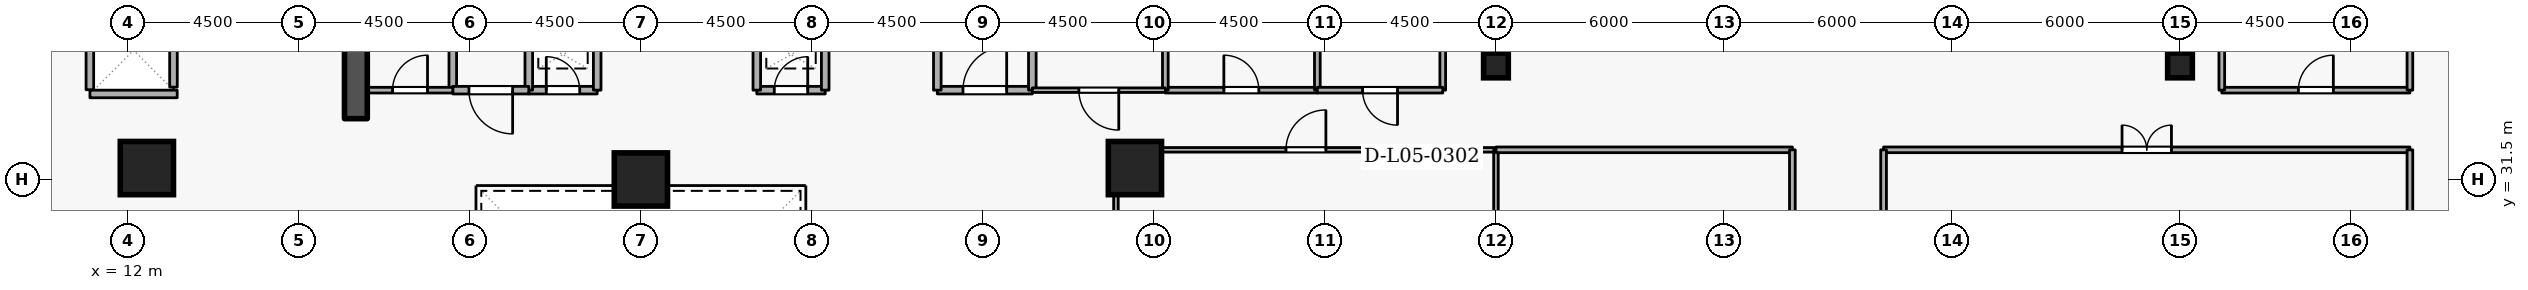
"""IFC4 building model, lengths in metres.
Left out: names, types, materials, properties, quantities, classifications, styles, units other than length and angle.
Written with IfcOpenShell. Run it as: python <this file> out.ifc"""

import sys

from ifc_helpers import new_model, si_unit, direction, frame, frame_2d, origin, origin_2d, place, context, subcontext, project, spatial, rectangle, extrude, element, fill, save


model = new_model("IFC4")
c1 = context("Model", 3, precision=1e-05, world=origin(), true_north=direction((0.0, 1.0)))
c2 = subcontext(c1, "Body", "Model", "MODEL_VIEW")
j1 = project(units=[si_unit("LENGTHUNIT", "METRE"), si_unit("PLANEANGLEUNIT", "RADIAN")], contexts=[c1])
p1 = place(None, origin())
s1 = spatial("IfcSite", under=j1, at=p1, CompositionType="ELEMENT")
p2 = place(p1, origin())
s2 = spatial("IfcBuilding", under=s1, at=p2, CompositionType="ELEMENT")
p3 = place(p2, frame((0.0, 0.0, 23.1)))
s3 = spatial("IfcBuildingStorey", under=s2, at=p3, CompositionType="ELEMENT", Elevation=23.1)
p4 = place(p3, frame((18.0, 33.1, 0.0), z_axis=(0.0, 0.0, 1.0), x_axis=(0.0, 1.0, 0.0)))
e1 = element("IfcWall", 1, at=p4, inside=s3, PredefinedType="SHEAR", context=c2, shape_type="SweptSolid", body=[
    extrude(rectangle(XDim=5.7, YDim=0.6, at=frame_2d((2.85, 0.0))), origin(), (0.0, 0.0, 1.0), 4.8),
])
for number, where, z_axis, x_axis in (
    (2, (12.5, 31.8, 0.0), (0.0, 0.0, 1.0), (1.0, 0.0, 0.0)),
    (3, (38.5, 31.8, 0.0), (0.0, 0.0, 1.0), (1.0, 0.0, 0.0)),
    (4, (25.5, 31.5, 0.0), (0.0, 0.0, 1.0), (1.0, 0.0, 0.0)),
):
    element("IfcColumn", number, at=place(p3, frame(where, z_axis=z_axis, x_axis=x_axis)), inside=s3, PredefinedType="COLUMN", context=c2, shape_type="SweptSolid", body=[
        extrude(rectangle(XDim=1.4, YDim=1.4, at=origin_2d()), origin(), (0.0, 0.0, 1.0), 4.8),
    ])
for number, where, z_axis, x_axis in (
    (5, (48.0, 34.5, 0.0), (0.0, 0.0, 1.0), (1.0, 0.0, 0.0)),
    (6, (66.0, 34.5, 0.0), (0.0, 0.0, 1.0), (1.0, 0.0, 0.0)),
):
    element("IfcColumn", number, at=place(p3, frame(where, z_axis=z_axis, x_axis=x_axis)), inside=s3, PredefinedType="COLUMN", context=c2, shape_type="SweptSolid", body=[
        extrude(rectangle(XDim=0.65, YDim=0.65, at=origin_2d()), origin(), (0.0, 0.0, 1.0), 4.8),
    ])
p5 = place(p3, frame((13.2, 33.93, 0.0), z_axis=(0.0, 0.0, 1.0), x_axis=(0.0, 1.0, 0.0)))
e7 = element("IfcWall", 7, at=p5, inside=s3, PredefinedType="STANDARD", context=c2, shape_type="SweptSolid", body=[
    extrude(rectangle(XDim=1.94, YDim=0.2, at=frame_2d((0.97, 0.0))), origin(), (0.0, 0.0, 1.0), 4.54),
])
p6 = place(p3, frame((11.002, 33.75, 0.0), z_axis=(0.0, 0.0, 1.0), x_axis=(1.0, 0.0, 0.0)))
e8 = element("IfcWall", 8, at=p6, inside=s3, PredefinedType="STANDARD", context=c2, shape_type="SweptSolid", body=[
    extrude(rectangle(XDim=2.296, YDim=0.2, at=frame_2d((1.148, 0.0))), origin(), (0.0, 0.0, 1.0), 4.54),
])
p7 = place(p3, frame((11.0, 33.862, 0.0), z_axis=(0.0, 0.0, 1.0), x_axis=(0.0, 1.0, 0.0)))
e9 = element("IfcWall", 9, at=p7, inside=s3, PredefinedType="STANDARD", context=c2, shape_type="SweptSolid", body=[
    extrude(rectangle(XDim=2.076, YDim=0.2, at=frame_2d((1.038, 0.0))), origin(), (0.0, 0.0, 1.0), 4.54),
])
p8 = place(p3, frame((33.3, 33.85, 0.0), z_axis=(0.0, 0.0, 1.0), x_axis=(1.0, 0.0, 0.0)))
e10 = element("IfcWall", 10, at=p8, inside=s3, PredefinedType="STANDARD", context=c2, shape_type="SweptSolid", body=[
    extrude(rectangle(XDim=2.5, YDim=0.2, at=frame_2d((1.25, 0.0))), origin(), (0.0, 0.0, 1.0), 4.54),
])
p9 = place(p8, frame((0.675, 0.0, 0.0)))
e11 = element("IfcOpeningElement", 11, at=p9, cuts=e10, PredefinedType="OPENING", context=c2, shape_type="SweptSolid", body=[
    extrude(rectangle(XDim=1.15, YDim=2.1, at=frame_2d((0.575, 1.05))), frame((0.0, 0.11, 0.0), z_axis=(0.0, -1.0, 0.0), x_axis=(1.0, 0.0, 0.0)), (0.0, 0.0, 1.0), 0.22),
])
p10 = place(p3, frame((35.8, 33.85, 0.0), z_axis=(0.0, 0.0, 1.0), x_axis=(0.0, 1.0, 0.0)))
e12 = element("IfcWall", 12, at=p10, inside=s3, PredefinedType="STANDARD", context=c2, shape_type="SweptSolid", body=[
    extrude(rectangle(XDim=5.15, YDim=0.2, at=frame_2d((2.575, 0.0))), origin(), (0.0, 0.0, 1.0), 4.54),
])
p11 = place(p3, frame((33.3, 35.6, 0.0), z_axis=(0.0, 0.0, 1.0), x_axis=(0.0, -1.0, 0.0)))
e13 = element("IfcWall", 13, at=p11, inside=s3, PredefinedType="STANDARD", context=c2, shape_type="SweptSolid", body=[
    extrude(rectangle(XDim=1.75, YDim=0.2, at=frame_2d((0.875, 0.0))), origin(), (0.0, 0.0, 1.0), 3.745),
])
p12 = place(p3, frame((22.55, 33.85, 0.0), z_axis=(0.0, 0.0, 1.0), x_axis=(1.0, 0.0, 0.0)))
e14 = element("IfcWall", 14, at=p12, inside=s3, PredefinedType="STANDARD", context=c2, shape_type="SweptSolid", body=[
    extrude(rectangle(XDim=1.8, YDim=0.2, at=frame_2d((0.9, 0.0))), origin(), (0.0, 0.0, 1.0), 4.54),
])
p13 = place(p12, frame((0.46, 0.0, 0.0)))
e15 = element("IfcOpeningElement", 15, at=p13, cuts=e14, PredefinedType="OPENING", context=c2, shape_type="SweptSolid", body=[
    extrude(rectangle(XDim=0.88, YDim=2.04, at=frame_2d((0.44, 1.02))), frame((0.0, 0.11, 0.0), z_axis=(0.0, -1.0, 0.0), x_axis=(1.0, 0.0, 0.0)), (0.0, 0.0, 1.0), 0.22),
])
for number, where, z_axis, x_axis in (
    (16, (24.35, 33.85, 0.0), (0.0, 0.0, 1.0), (0.0, 1.0, 0.0)),
    (17, (22.55, 35.35, 0.0), (0.0, 0.0, 1.0), (0.0, -1.0, 0.0)),
):
    element("IfcWall", number, at=place(p3, frame(where, z_axis=z_axis, x_axis=x_axis)), inside=s3, PredefinedType="STANDARD", context=c2, shape_type="SweptSolid", body=[
        extrude(rectangle(XDim=1.5, YDim=0.2, at=frame_2d((0.75, 0.0))), origin(), (0.0, 0.0, 1.0), 4.54),
    ])
p14 = place(p3, frame((28.55, 33.85, 0.0), z_axis=(0.0, 0.0, 1.0), x_axis=(1.0, 0.0, 0.0)))
e18 = element("IfcWall", 18, at=p14, inside=s3, PredefinedType="STANDARD", context=c2, shape_type="SweptSolid", body=[
    extrude(rectangle(XDim=1.8, YDim=0.2, at=frame_2d((0.9, 0.0))), origin(), (0.0, 0.0, 1.0), 4.54),
])
p15 = place(p14, frame((0.46, 0.0, 0.0)))
e19 = element("IfcOpeningElement", 19, at=p15, cuts=e18, PredefinedType="OPENING", context=c2, shape_type="SweptSolid", body=[
    extrude(rectangle(XDim=0.88, YDim=2.04, at=frame_2d((0.44, 1.02))), frame((0.0, 0.11, 0.0), z_axis=(0.0, -1.0, 0.0), x_axis=(1.0, 0.0, 0.0)), (0.0, 0.0, 1.0), 0.22),
])
for number, where, z_axis, x_axis in (
    (20, (30.35, 33.85, 0.0), (0.0, 0.0, 1.0), (0.0, 1.0, 0.0)),
    (21, (28.55, 35.35, 0.0), (0.0, 0.0, 1.0), (0.0, -1.0, 0.0)),
    (22, (20.55, 33.85, 0.0), (0.0, 0.0, 1.0), (0.0, 1.0, 0.0)),
):
    element("IfcWall", number, at=place(p3, frame(where, z_axis=z_axis, x_axis=x_axis)), inside=s3, PredefinedType="STANDARD", context=c2, shape_type="SweptSolid", body=[
        extrude(rectangle(XDim=1.5, YDim=0.2, at=frame_2d((0.75, 0.0))), origin(), (0.0, 0.0, 1.0), 4.54),
    ])
p16 = place(p3, frame((22.55, 33.85, 0.0), z_axis=(0.0, 0.0, 1.0), x_axis=(-1.0, 0.0, 0.0)))
e23 = element("IfcWall", 23, at=p16, inside=s3, PredefinedType="STANDARD", context=c2, shape_type="SweptSolid", body=[
    extrude(rectangle(XDim=2.0, YDim=0.2, at=frame_2d((1.0, 0.0))), origin(), (0.0, 0.0, 1.0), 4.54),
])
p17 = place(p16, frame((0.425, 0.0, 0.0)))
e24 = element("IfcOpeningElement", 24, at=p17, cuts=e23, PredefinedType="OPENING", context=c2, shape_type="SweptSolid", body=[
    extrude(rectangle(XDim=1.15, YDim=2.1, at=frame_2d((0.575, 1.05))), frame((0.0, 0.11, 0.0), z_axis=(0.0, -1.0, 0.0), x_axis=(1.0, 0.0, 0.0)), (0.0, 0.0, 1.0), 0.22),
])
p18 = place(p3, frame((18.3, 33.85, 0.0), z_axis=(0.0, 0.0, 1.0), x_axis=(1.0, 0.0, 0.0)))
e25 = element("IfcWall", 25, at=p18, inside=s3, PredefinedType="PARTITIONING", context=c2, shape_type="SweptSolid", body=[
    extrude(rectangle(XDim=2.25, YDim=0.15, at=frame_2d((1.125, 0.0))), origin(), (0.0, 0.0, 1.0), 4.54),
])
p19 = place(p18, frame((0.665, 0.0, 0.0)))
e26 = element("IfcOpeningElement", 26, at=p19, cuts=e25, PredefinedType="OPENING", context=c2, shape_type="SweptSolid", body=[
    extrude(rectangle(XDim=0.92, YDim=2.08, at=frame_2d((0.46, 1.04))), frame((0.0, 0.085, 0.0), z_axis=(0.0, -1.0, 0.0), x_axis=(1.0, 0.0, 0.0)), (0.0, 0.0, 1.0), 0.17),
])
p20 = place(p3, frame((39.3, 33.85, 0.0), z_axis=(0.0, 0.0, 1.0), x_axis=(1.0, 0.0, 0.0)))
e27 = element("IfcWall", 27, at=p20, inside=s3, PredefinedType="PARTITIONING", context=c2, shape_type="SweptSolid", body=[
    extrude(rectangle(XDim=4.0, YDim=0.15, at=frame_2d((2.0, 0.0))), origin(), (0.0, 0.0, 1.0), 4.54),
])
p21 = place(p20, frame((1.54, 0.0, 0.0)))
e28 = element("IfcOpeningElement", 28, at=p21, cuts=e27, PredefinedType="OPENING", context=c2, shape_type="SweptSolid", body=[
    extrude(rectangle(XDim=0.92, YDim=2.08, at=frame_2d((0.46, 1.04))), frame((0.0, 0.085, 0.0), z_axis=(0.0, -1.0, 0.0), x_axis=(1.0, 0.0, 0.0)), (0.0, 0.0, 1.0), 0.17),
])
for number, where, z_axis, x_axis in (
    (29, (43.3, 33.85, 0.0), (0.0, 0.0, 1.0), (0.0, 1.0, 0.0)),
    (30, (39.3, 37.8, 0.0), (0.0, 0.0, 1.0), (0.0, -1.0, 0.0)),
):
    element("IfcWall", number, at=place(p3, frame(where, z_axis=z_axis, x_axis=x_axis)), inside=s3, PredefinedType="PARTITIONING", context=c2, shape_type="SweptSolid", body=[
        extrude(rectangle(XDim=3.95, YDim=0.15, at=frame_2d((1.975, 0.0))), origin(), (0.0, 0.0, 1.0), 4.54),
    ])
p22 = place(p3, frame((67.1, 33.85, 0.0), z_axis=(0.0, 0.0, 1.0), x_axis=(1.0, 0.0, 0.0)))
e31 = element("IfcWall", 31, at=p22, inside=s3, PredefinedType="PARTITIONING", context=c2, shape_type="SweptSolid", body=[
    extrude(rectangle(XDim=4.95, YDim=0.15, at=frame_2d((2.475, 0.0))), origin(), (0.0, 0.0, 1.0), 4.54),
])
p23 = place(p22, frame((2.015, 0.0, 0.0)))
e32 = element("IfcOpeningElement", 32, at=p23, cuts=e31, PredefinedType="OPENING", context=c2, shape_type="SweptSolid", body=[
    extrude(rectangle(XDim=0.92, YDim=2.08, at=frame_2d((0.46, 1.04))), frame((0.0, 0.085, 0.0), z_axis=(0.0, -1.0, 0.0), x_axis=(1.0, 0.0, 0.0)), (0.0, 0.0, 1.0), 0.17),
])
for number, where, z_axis, x_axis in (
    (33, (72.05, 33.85, 0.0), (0.0, 0.0, 1.0), (0.0, 1.0, 0.0)),
    (34, (67.1, 37.8, 0.0), (0.0, 0.0, 1.0), (0.0, -1.0, 0.0)),
    (35, (46.6, 37.8, 0.0), (0.0, 0.0, 1.0), (0.0, -1.0, 0.0)),
):
    element("IfcWall", number, at=place(p3, frame(where, z_axis=z_axis, x_axis=x_axis)), inside=s3, PredefinedType="PARTITIONING", context=c2, shape_type="SweptSolid", body=[
        extrude(rectangle(XDim=3.95, YDim=0.15, at=frame_2d((1.975, 0.0))), origin(), (0.0, 0.0, 1.0), 4.54),
    ])
p24 = place(p3, frame((46.6, 33.85, 0.0), z_axis=(0.0, 0.0, 1.0), x_axis=(-1.0, 0.0, 0.0)))
e36 = element("IfcWall", 36, at=p24, inside=s3, PredefinedType="PARTITIONING", context=c2, shape_type="SweptSolid", body=[
    extrude(rectangle(XDim=3.3, YDim=0.15, at=frame_2d((1.65, 0.0))), origin(), (0.0, 0.0, 1.0), 4.54),
])
p25 = place(p24, frame((1.19, 0.0, 0.0)))
e37 = element("IfcOpeningElement", 37, at=p25, cuts=e36, PredefinedType="OPENING", context=c2, shape_type="SweptSolid", body=[
    extrude(rectangle(XDim=0.92, YDim=2.08, at=frame_2d((0.46, 1.04))), frame((0.0, 0.085, 0.0), z_axis=(0.0, -1.0, 0.0), x_axis=(1.0, 0.0, 0.0)), (0.0, 0.0, 1.0), 0.17),
])
p26 = place(p3, frame((38.0, 32.28, 0.0), z_axis=(0.0, 0.0, 1.0), x_axis=(1.0, 0.0, 0.0)))
e38 = element("IfcWall", 38, at=p26, inside=s3, PredefinedType="PARTITIONING", context=c2, shape_type="SweptSolid", body=[
    extrude(rectangle(XDim=10.0, YDim=0.12, at=frame_2d((5.0, 0.0))), origin(), (0.0, 0.0, 1.0), 4.54),
])
p27 = place(p26, frame((4.475, 0.0, 0.0)))
e39 = element("IfcOpeningElement", 39, at=p27, cuts=e38, PredefinedType="OPENING", context=c2, shape_type="SweptSolid", body=[
    extrude(rectangle(XDim=1.05, YDim=2.1, at=frame_2d((0.525, 1.05))), frame((0.0, 0.07, 0.0), z_axis=(0.0, -1.0, 0.0), x_axis=(1.0, 0.0, 0.0)), (0.0, 0.0, 1.0), 0.14),
])
p28 = place(p3, frame((48.0, 32.28, 0.0), z_axis=(0.0, 0.0, 1.0), x_axis=(0.0, -1.0, 0.0)))
e40 = element("IfcWall", 40, at=p28, inside=s3, PredefinedType="PARTITIONING", context=c2, shape_type="SweptSolid", body=[
    extrude(rectangle(XDim=9.98, YDim=0.12, at=frame_2d((4.99, 0.0))), origin(), (0.0, 0.0, 1.0), 3.694),
])
p29 = place(p3, frame((38.0, 22.3, 0.0), z_axis=(0.0, 0.0, 1.0), x_axis=(0.0, 1.0, 0.0)))
e41 = element("IfcWall", 41, at=p29, inside=s3, PredefinedType="PARTITIONING", context=c2, shape_type="SweptSolid", body=[
    extrude(rectangle(XDim=9.98, YDim=0.12, at=frame_2d((4.99, 0.0))), origin(), (0.0, 0.0, 1.0), 4.54),
])
p30 = place(p3, frame((58.2, 32.28, 0.0), z_axis=(0.0, 0.0, 1.0), x_axis=(1.0, 0.0, 0.0)))
e42 = element("IfcWall", 42, at=p30, inside=s3, PredefinedType="PARTITIONING", context=c2, shape_type="SweptSolid", body=[
    extrude(rectangle(XDim=13.85, YDim=0.15, at=frame_2d((6.925, 0.0))), origin(), (0.0, 0.0, 1.0), 4.54),
])
p31 = place(p30, frame((6.275, 0.0, 0.0)))
e43 = element("IfcOpeningElement", 43, at=p31, cuts=e42, PredefinedType="OPENING", context=c2, shape_type="SweptSolid", body=[
    extrude(rectangle(XDim=1.3, YDim=2.12, at=frame_2d((0.65, 1.06))), frame((0.0, 0.085, 0.0), z_axis=(0.0, -1.0, 0.0), x_axis=(1.0, 0.0, 0.0)), (0.0, 0.0, 1.0), 0.17),
])
for number, where, z_axis, x_axis in (
    (44, (72.05, 32.28, 0.0), (0.0, 0.0, 1.0), (0.0, -1.0, 0.0)),
    (45, (58.2, 22.3, 0.0), (0.0, 0.0, 1.0), (0.0, 1.0, 0.0)),
):
    element("IfcWall", number, at=place(p3, frame(where, z_axis=z_axis, x_axis=x_axis)), inside=s3, PredefinedType="PARTITIONING", context=c2, shape_type="SweptSolid", body=[
        extrude(rectangle(XDim=9.98, YDim=0.15, at=frame_2d((4.99, 0.0))), origin(), (0.0, 0.0, 1.0), 4.54),
    ])
p32 = place(p3, frame((39.3, 33.85, 0.0), z_axis=(0.0, 0.0, 1.0), x_axis=(-1.0, 0.0, 0.0)))
e46 = element("IfcWall", 46, at=p32, inside=s3, PredefinedType="PARTITIONING", context=c2, shape_type="SweptSolid", body=[
    extrude(rectangle(XDim=3.5, YDim=0.12, at=frame_2d((1.75, 0.0))), origin(), (0.0, 0.0, 1.0), 4.54),
])
p33 = place(p32, frame((1.225, 0.0, 0.0)))
e47 = element("IfcOpeningElement", 47, at=p33, cuts=e46, PredefinedType="OPENING", context=c2, shape_type="SweptSolid", body=[
    extrude(rectangle(XDim=1.05, YDim=2.1, at=frame_2d((0.525, 1.05))), frame((0.0, 0.07, 0.0), z_axis=(0.0, -1.0, 0.0), x_axis=(1.0, 0.0, 0.0)), (0.0, 0.0, 1.0), 0.14),
])
p34 = place(p3, frame((48.0, 32.28, 0.0), z_axis=(0.0, 0.0, 1.0), x_axis=(1.0, 0.0, 0.0)))
e48 = element("IfcWall", 48, at=p34, inside=s3, PredefinedType="PARTITIONING", context=c2, shape_type="SweptSolid", body=[
    extrude(rectangle(XDim=7.8, YDim=0.15, at=frame_2d((3.9, 0.0))), origin(), (0.0, 0.0, 1.0), 4.54),
])
p35 = place(p3, frame((55.8, 32.28, 0.0), z_axis=(0.0, 0.0, 1.0), x_axis=(0.0, -1.0, 0.0)))
e49 = element("IfcWall", 49, at=p35, inside=s3, PredefinedType="PARTITIONING", context=c2, shape_type="SweptSolid", body=[
    extrude(rectangle(XDim=9.98, YDim=0.15, at=frame_2d((4.99, 0.0))), origin(), (0.0, 0.0, 1.0), 4.54),
])
p36 = place(p35, frame((4.34, 0.0, 0.0)))
e50 = element("IfcOpeningElement", 50, at=p36, cuts=e49, PredefinedType="OPENING", context=c2, shape_type="SweptSolid", body=[
    extrude(rectangle(XDim=1.3, YDim=2.12, at=frame_2d((0.65, 1.06))), frame((0.0, 0.085, 0.0), z_axis=(0.0, -1.0, 0.0), x_axis=(1.0, 0.0, 0.0)), (0.0, 0.0, 1.0), 0.17),
])
p37 = place(p9, origin())
e51 = element("IfcDoor", 51, at=p37, inside=s3, OperationType="SINGLE_SWING_RIGHT", PredefinedType="DOOR", context=c2, shape_type="SweptSolid", body=[
    extrude(rectangle(XDim=1.15, YDim=2.1, at=frame_2d((0.575, 1.05))), frame((0.0, 0.025, 0.0), z_axis=(0.0, -1.0, 0.0), x_axis=(1.0, 0.0, 0.0)), (0.0, 0.0, 1.0), 0.05),
])
fill(e11, e51)
p38 = place(p13, origin())
e52 = element("IfcDoor", 52, at=p38, inside=s3, OperationType="SINGLE_SWING_LEFT", PredefinedType="DOOR", context=c2, shape_type="SweptSolid", body=[
    extrude(rectangle(XDim=0.88, YDim=2.04, at=frame_2d((0.44, 1.02))), frame((0.0, 0.025, 0.0), z_axis=(0.0, -1.0, 0.0), x_axis=(1.0, 0.0, 0.0)), (0.0, 0.0, 1.0), 0.05),
])
fill(e15, e52)
p39 = place(p15, origin())
e53 = element("IfcDoor", 53, at=p39, inside=s3, OperationType="SINGLE_SWING_RIGHT", PredefinedType="DOOR", context=c2, shape_type="SweptSolid", body=[
    extrude(rectangle(XDim=0.88, YDim=2.04, at=frame_2d((0.44, 1.02))), frame((0.0, 0.025, 0.0), z_axis=(0.0, -1.0, 0.0), x_axis=(1.0, 0.0, 0.0)), (0.0, 0.0, 1.0), 0.05),
])
fill(e19, e53)
p40 = place(p19, origin())
e54 = element("IfcDoor", 54, at=p40, inside=s3, OperationType="SINGLE_SWING_RIGHT", PredefinedType="DOOR", context=c2, shape_type="SweptSolid", body=[
    extrude(rectangle(XDim=0.92, YDim=2.08, at=frame_2d((0.46, 1.04))), frame((0.0, 0.025, 0.0), z_axis=(0.0, -1.0, 0.0), x_axis=(1.0, 0.0, 0.0)), (0.0, 0.0, 1.0), 0.05),
])
fill(e26, e54)
p41 = place(p17, origin())
e55 = element("IfcDoor", 55, at=p41, inside=s3, OperationType="SINGLE_SWING_LEFT", PredefinedType="DOOR", context=c2, shape_type="SweptSolid", body=[
    extrude(rectangle(XDim=1.15, YDim=2.1, at=frame_2d((0.575, 1.05))), frame((0.0, 0.025, 0.0), z_axis=(0.0, -1.0, 0.0), x_axis=(1.0, 0.0, 0.0)), (0.0, 0.0, 1.0), 0.05),
])
fill(e24, e55)
p42 = place(p21, origin())
e56 = element("IfcDoor", 56, at=p42, inside=s3, OperationType="SINGLE_SWING_LEFT", PredefinedType="DOOR", context=c2, shape_type="SweptSolid", body=[
    extrude(rectangle(XDim=0.92, YDim=2.08, at=frame_2d((0.46, 1.04))), frame((0.0, 0.025, 0.0), z_axis=(0.0, -1.0, 0.0), x_axis=(1.0, 0.0, 0.0)), (0.0, 0.0, 1.0), 0.05),
])
fill(e28, e56)
p43 = place(p23, origin())
e57 = element("IfcDoor", 57, at=p43, inside=s3, OperationType="SINGLE_SWING_RIGHT", PredefinedType="DOOR", context=c2, shape_type="SweptSolid", body=[
    extrude(rectangle(XDim=0.92, YDim=2.08, at=frame_2d((0.46, 1.04))), frame((0.0, 0.025, 0.0), z_axis=(0.0, -1.0, 0.0), x_axis=(1.0, 0.0, 0.0)), (0.0, 0.0, 1.0), 0.05),
])
fill(e32, e57)
p44 = place(p25, origin())
e58 = element("IfcDoor", 58, at=p44, inside=s3, OperationType="SINGLE_SWING_LEFT", PredefinedType="DOOR", context=c2, shape_type="SweptSolid", body=[
    extrude(rectangle(XDim=0.92, YDim=2.08, at=frame_2d((0.46, 1.04))), frame((0.0, 0.025, 0.0), z_axis=(0.0, -1.0, 0.0), x_axis=(1.0, 0.0, 0.0)), (0.0, 0.0, 1.0), 0.05),
])
fill(e37, e58)
p45 = place(p27, origin())
e59 = element("IfcDoor", 59, at=p45, inside=s3, OperationType="SINGLE_SWING_RIGHT", PredefinedType="DOOR", context=c2, shape_type="SweptSolid", body=[
    extrude(rectangle(XDim=1.05, YDim=2.1, at=frame_2d((0.525, 1.05))), frame((0.0, 0.025, 0.0), z_axis=(0.0, -1.0, 0.0), x_axis=(1.0, 0.0, 0.0)), (0.0, 0.0, 1.0), 0.05),
])
fill(e39, e59)
p46 = place(p31, origin())
e60 = element("IfcDoor", 60, at=p46, inside=s3, OperationType="DOUBLE_DOOR_SINGLE_SWING", PredefinedType="DOOR", context=c2, shape_type="SweptSolid", body=[
    extrude(rectangle(XDim=1.3, YDim=2.12, at=frame_2d((0.65, 1.06))), frame((0.0, 0.025, 0.0), z_axis=(0.0, -1.0, 0.0), x_axis=(1.0, 0.0, 0.0)), (0.0, 0.0, 1.0), 0.05),
])
fill(e43, e60)
p47 = place(p33, origin())
e61 = element("IfcDoor", 61, at=p47, inside=s3, OperationType="SINGLE_SWING_LEFT", PredefinedType="DOOR", context=c2, shape_type="SweptSolid", body=[
    extrude(rectangle(XDim=1.05, YDim=2.1, at=frame_2d((0.525, 1.05))), frame((0.0, 0.025, 0.0), z_axis=(0.0, -1.0, 0.0), x_axis=(1.0, 0.0, 0.0)), (0.0, 0.0, 1.0), 0.05),
])
fill(e47, e61)
save(model, sys.argv[1])
